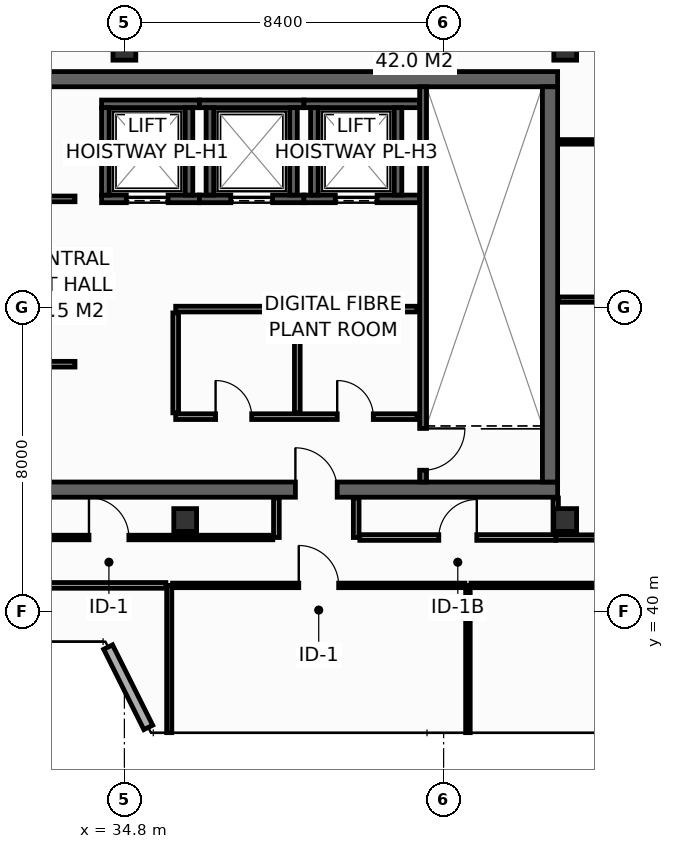
"""IFC4 building model, lengths in metres.
Left out: names, types, materials, properties, quantities, classifications, styles, units other than length and angle.
Written with IfcOpenShell. Run it as: python <this file> out.ifc"""

import sys

from ifc_helpers import new_model, si_unit, direction, frame, frame_2d, origin, origin_2d, place, context, subcontext, project, spatial, rectangle, hollow_rectangle, extrude, element, fill, save


model = new_model("IFC4")
c1 = context("Model", 3, precision=1e-05, world=origin(), true_north=direction((0.0, 1.0)))
c2 = subcontext(c1, "Body", "Model", "MODEL_VIEW")
j1 = project(units=[si_unit("LENGTHUNIT", "METRE"), si_unit("PLANEANGLEUNIT", "RADIAN")], contexts=[c1])
p1 = place(None, origin())
s1 = spatial("IfcSite", under=j1, at=p1, CompositionType="ELEMENT")
p2 = place(p1, origin())
s2 = spatial("IfcBuilding", under=s1, at=p2, CompositionType="ELEMENT")
p3 = place(p2, frame((0.0, 0.0, 323.4)))
s3 = spatial("IfcBuildingStorey", under=s2, at=p3, CompositionType="ELEMENT", Elevation=323.4)
p4 = place(p3, frame((13.7, 43.2, 0.0), z_axis=(0.0, 0.0, 1.0), x_axis=(1.0, 0.0, 0.0)))
e1 = element("IfcWall", 1, at=p4, inside=s3, PredefinedType="SHEAR", context=c2, shape_type="SweptSolid", body=[
    extrude(rectangle(XDim=32.5, YDim=0.4, at=frame_2d((16.25, 0.0))), origin(), (0.0, 0.0, 1.0), 3.9),
])
p5 = place(p4, frame((5.4, 0.0, 0.0)))
e2 = element("IfcOpeningElement", 2, at=p5, cuts=e1, PredefinedType="OPENING", context=c2, shape_type="SweptSolid", body=[
    extrude(rectangle(XDim=1.1, YDim=2.15, at=frame_2d((0.55, 1.075))), frame((0.0, 0.21, 0.0), z_axis=(0.0, -1.0, 0.0), x_axis=(1.0, 0.0, 0.0)), (0.0, 0.0, 1.0), 0.42),
])
p6 = place(p4, frame((25.6, 0.0, 0.0)))
e3 = element("IfcOpeningElement", 3, at=p6, cuts=e1, PredefinedType="OPENING", context=c2, shape_type="SweptSolid", body=[
    extrude(rectangle(XDim=1.1, YDim=2.15, at=frame_2d((0.55, 1.075))), frame((0.0, 0.21, 0.0), z_axis=(0.0, -1.0, 0.0), x_axis=(1.0, 0.0, 0.0)), (0.0, 0.0, 1.0), 0.42),
])
p7 = place(p3, frame((13.7, 54.0, 0.0), z_axis=(0.0, 0.0, 1.0), x_axis=(1.0, 0.0, 0.0)))
e4 = element("IfcWall", 4, at=p7, inside=s3, PredefinedType="SHEAR", context=c2, shape_type="SweptSolid", body=[
    extrude(rectangle(XDim=32.5, YDim=0.4, at=frame_2d((16.25, 0.0))), origin(), (0.0, 0.0, 1.0), 3.9),
])
p8 = place(p3, frame((46.0, 43.4, 0.0), z_axis=(0.0, 0.0, 1.0), x_axis=(0.0, 1.0, 0.0)))
e5 = element("IfcWall", 5, at=p8, inside=s3, PredefinedType="SHEAR", context=c2, shape_type="SweptSolid", body=[
    extrude(rectangle(XDim=10.4, YDim=0.4, at=frame_2d((5.2, 0.0))), origin(), (0.0, 0.0, 1.0), 3.9),
])
for number, where, z_axis, x_axis in (
    (6, (34.8, 54.8, 0.0), (0.0, 0.0, 1.0), (1.0, 0.0, 0.0)),
    (7, (46.4, 54.8, 0.0), (0.0, 0.0, 1.0), (1.0, 0.0, 0.0)),
    (8, (36.4, 42.4, 0.0), (0.0, 0.0, 1.0), (1.0, 0.0, 0.0)),
    (9, (46.4, 42.4, 0.0), (0.0, 0.0, 1.0), (1.0, 0.0, 0.0)),
):
    element("IfcColumn", number, at=place(p3, frame(where, z_axis=z_axis, x_axis=x_axis)), inside=s3, PredefinedType="COLUMN", context=c2, shape_type="SweptSolid", body=[
        extrude(hollow_rectangle(XDim=0.6, YDim=0.6, WallThickness=0.028, at=origin_2d()), origin(), (0.0, 0.0, 1.0), 4.2),
    ])
p9 = place(p3, frame((34.2, 50.85, 0.0), z_axis=(0.0, 0.0, 1.0), x_axis=(1.0, 0.0, 0.0)))
e10 = element("IfcWall", 10, at=p9, inside=s3, PredefinedType="SHEAR", context=c2, shape_type="SweptSolid", body=[
    extrude(rectangle(XDim=2.575, YDim=0.2, at=frame_2d((1.288, 0.0))), origin(), (0.0, 0.0, 1.0), 3.68),
])
p10 = place(p9, frame((0.65, 0.0, 0.0)))
e11 = element("IfcOpeningElement", 11, at=p10, cuts=e10, PredefinedType="OPENING", context=c2, shape_type="SweptSolid", body=[
    extrude(rectangle(XDim=1.1, YDim=2.2, at=frame_2d((0.55, 1.1))), frame((0.0, 0.11, 0.0), z_axis=(0.0, -1.0, 0.0), x_axis=(1.0, 0.0, 0.0)), (0.0, 0.0, 1.0), 0.22),
])
p11 = place(p3, frame((34.2, 53.35, 0.0), z_axis=(0.0, 0.0, 1.0), x_axis=(1.0, 0.0, 0.0)))
e12 = element("IfcWall", 12, at=p11, inside=s3, PredefinedType="SHEAR", context=c2, shape_type="SweptSolid", body=[
    extrude(rectangle(XDim=2.575, YDim=0.2, at=frame_2d((1.288, 0.0))), origin(), (0.0, 0.0, 1.0), 3.68),
])
for number, where, z_axis, x_axis in (
    (13, (34.3, 50.95, 0.0), (0.0, 0.0, 1.0), (0.0, 1.0, 0.0)),
    (14, (36.5, 50.95, 0.0), (0.0, 0.0, 1.0), (0.0, 1.0, 0.0)),
):
    element("IfcWall", number, at=place(p3, frame(where, z_axis=z_axis, x_axis=x_axis)), inside=s3, PredefinedType="SHEAR", context=c2, shape_type="SweptSolid", body=[
        extrude(rectangle(XDim=2.3, YDim=0.2, at=frame_2d((1.15, 0.0))), origin(), (0.0, 0.0, 1.0), 3.68),
    ])
p12 = place(p3, frame((36.775, 50.85, 0.0), z_axis=(0.0, 0.0, 1.0), x_axis=(1.0, 0.0, 0.0)))
e15 = element("IfcWall", 15, at=p12, inside=s3, PredefinedType="SHEAR", context=c2, shape_type="SweptSolid", body=[
    extrude(rectangle(XDim=2.75, YDim=0.2, at=frame_2d((1.375, 0.0))), origin(), (0.0, 0.0, 1.0), 3.68),
])
p13 = place(p12, frame((0.825, 0.0, 0.0)))
e16 = element("IfcOpeningElement", 16, at=p13, cuts=e15, PredefinedType="OPENING", context=c2, shape_type="SweptSolid", body=[
    extrude(rectangle(XDim=1.1, YDim=2.2, at=frame_2d((0.55, 1.1))), frame((0.0, 0.11, 0.0), z_axis=(0.0, -1.0, 0.0), x_axis=(1.0, 0.0, 0.0)), (0.0, 0.0, 1.0), 0.22),
])
p14 = place(p3, frame((36.775, 53.35, 0.0), z_axis=(0.0, 0.0, 1.0), x_axis=(1.0, 0.0, 0.0)))
e17 = element("IfcWall", 17, at=p14, inside=s3, PredefinedType="SHEAR", context=c2, shape_type="SweptSolid", body=[
    extrude(rectangle(XDim=2.75, YDim=0.2, at=frame_2d((1.375, 0.0))), origin(), (0.0, 0.0, 1.0), 3.68),
])
for number, where, z_axis, x_axis in (
    (18, (37.05, 50.95, 0.0), (0.0, 0.0, 1.0), (0.0, 1.0, 0.0)),
    (19, (39.25, 50.95, 0.0), (0.0, 0.0, 1.0), (0.0, 1.0, 0.0)),
):
    element("IfcWall", number, at=place(p3, frame(where, z_axis=z_axis, x_axis=x_axis)), inside=s3, PredefinedType="SHEAR", context=c2, shape_type="SweptSolid", body=[
        extrude(rectangle(XDim=2.3, YDim=0.2, at=frame_2d((1.15, 0.0))), origin(), (0.0, 0.0, 1.0), 3.68),
    ])
p15 = place(p3, frame((39.525, 50.85, 0.0), z_axis=(0.0, 0.0, 1.0), x_axis=(1.0, 0.0, 0.0)))
e20 = element("IfcWall", 20, at=p15, inside=s3, PredefinedType="SHEAR", context=c2, shape_type="SweptSolid", body=[
    extrude(rectangle(XDim=3.045, YDim=0.2, at=frame_2d((1.522, 0.0))), origin(), (0.0, 0.0, 1.0), 3.68),
])
p16 = place(p15, frame((0.825, 0.0, 0.0)))
e21 = element("IfcOpeningElement", 21, at=p16, cuts=e20, PredefinedType="OPENING", context=c2, shape_type="SweptSolid", body=[
    extrude(rectangle(XDim=1.1, YDim=2.2, at=frame_2d((0.55, 1.1))), frame((0.0, 0.11, 0.0), z_axis=(0.0, -1.0, 0.0), x_axis=(1.0, 0.0, 0.0)), (0.0, 0.0, 1.0), 0.22),
])
p17 = place(p3, frame((39.525, 53.35, 0.0), z_axis=(0.0, 0.0, 1.0), x_axis=(1.0, 0.0, 0.0)))
e22 = element("IfcWall", 22, at=p17, inside=s3, PredefinedType="SHEAR", context=c2, shape_type="SweptSolid", body=[
    extrude(rectangle(XDim=3.045, YDim=0.2, at=frame_2d((1.522, 0.0))), origin(), (0.0, 0.0, 1.0), 3.68),
])
for number, where, z_axis, x_axis in (
    (23, (39.8, 50.95, 0.0), (0.0, 0.0, 1.0), (0.0, 1.0, 0.0)),
    (24, (42.0, 50.95, 0.0), (0.0, 0.0, 1.0), (0.0, 1.0, 0.0)),
):
    element("IfcWall", number, at=place(p3, frame(where, z_axis=z_axis, x_axis=x_axis)), inside=s3, PredefinedType="SHEAR", context=c2, shape_type="SweptSolid", body=[
        extrude(rectangle(XDim=2.3, YDim=0.2, at=frame_2d((1.15, 0.0))), origin(), (0.0, 0.0, 1.0), 3.68),
    ])
p18 = place(p3, frame((42.66, 53.8, 0.0), z_axis=(0.0, 0.0, 1.0), x_axis=(0.0, -1.0, 0.0)))
e25 = element("IfcWall", 25, at=p18, inside=s3, PredefinedType="SHEAR", context=c2, shape_type="SweptSolid", body=[
    extrude(rectangle(XDim=10.4, YDim=0.18, at=frame_2d((5.2, 0.0))), origin(), (0.0, 0.0, 1.0), 3.9),
])
p19 = place(p18, frame((8.99, 0.0, 0.0)))
e26 = element("IfcOpeningElement", 26, at=p19, cuts=e25, PredefinedType="OPENING", context=c2, shape_type="SweptSolid", body=[
    extrude(rectangle(XDim=1.1, YDim=2.15, at=frame_2d((0.55, 1.075))), frame((0.0, 0.1, 0.0), z_axis=(0.0, -1.0, 0.0), x_axis=(1.0, 0.0, 0.0)), (0.0, 0.0, 1.0), 0.2),
])
p20 = place(p3, frame((36.15, 45.12, 0.0), z_axis=(0.0, 0.0, 1.0), x_axis=(1.0, 0.0, 0.0)))
e27 = element("IfcWall", 27, at=p20, inside=s3, PredefinedType="PARTITIONING", context=c2, shape_type="SweptSolid", body=[
    extrude(rectangle(XDim=6.35, YDim=0.15, at=frame_2d((3.175, 0.0))), origin(), (0.0, 0.0, 1.0), 3.9),
])
p21 = place(p20, frame((1.05, 0.0, 0.0)))
e28 = element("IfcOpeningElement", 28, at=p21, cuts=e27, PredefinedType="OPENING", context=c2, shape_type="SweptSolid", body=[
    extrude(rectangle(XDim=0.95, YDim=2.15, at=frame_2d((0.475, 1.075))), frame((0.0, 0.085, 0.0), z_axis=(0.0, -1.0, 0.0), x_axis=(1.0, 0.0, 0.0)), (0.0, 0.0, 1.0), 0.17),
])
p22 = place(p20, frame((4.25, 0.0, 0.0)))
e29 = element("IfcOpeningElement", 29, at=p22, cuts=e27, PredefinedType="OPENING", context=c2, shape_type="SweptSolid", body=[
    extrude(rectangle(XDim=0.95, YDim=2.15, at=frame_2d((0.475, 1.075))), frame((0.0, 0.085, 0.0), z_axis=(0.0, -1.0, 0.0), x_axis=(1.0, 0.0, 0.0)), (0.0, 0.0, 1.0), 0.17),
])
p23 = place(p3, frame((36.15, 47.95, 0.0), z_axis=(0.0, 0.0, 1.0), x_axis=(1.0, 0.0, 0.0)))
e30 = element("IfcWall", 30, at=p23, inside=s3, PredefinedType="PARTITIONING", context=c2, shape_type="SweptSolid", body=[
    extrude(rectangle(XDim=6.35, YDim=0.15, at=frame_2d((3.175, 0.0))), origin(), (0.0, 0.0, 1.0), 3.9),
])
for number, where, z_axis, x_axis in (
    (31, (36.15, 45.22, 0.0), (0.0, 0.0, 1.0), (0.0, 1.0, 0.0)),
    (32, (39.35, 45.22, 0.0), (0.0, 0.0, 1.0), (0.0, 1.0, 0.0)),
):
    element("IfcWall", number, at=place(p3, frame(where, z_axis=z_axis, x_axis=x_axis)), inside=s3, PredefinedType="PARTITIONING", context=c2, shape_type="SweptSolid", body=[
        extrude(rectangle(XDim=2.63, YDim=0.15, at=frame_2d((1.315, 0.0))), origin(), (0.0, 0.0, 1.0), 3.9),
    ])
p24 = place(p3, frame((25.85, 50.85, 0.0), z_axis=(0.0, 0.0, 1.0), x_axis=(1.0, 0.0, 0.0)))
e33 = element("IfcWall", 33, at=p24, inside=s3, PredefinedType="PARTITIONING", context=c2, shape_type="SweptSolid", body=[
    extrude(rectangle(XDim=7.65, YDim=0.15, at=frame_2d((3.825, 0.0))), origin(), (0.0, 0.0, 1.0), 3.9),
])
p25 = place(p24, frame((1.25, 0.0, 0.0)))
e34 = element("IfcOpeningElement", 34, at=p25, cuts=e33, PredefinedType="OPENING", context=c2, shape_type="SweptSolid", body=[
    extrude(rectangle(XDim=0.95, YDim=2.15, at=frame_2d((0.475, 1.075))), frame((0.0, 0.085, 0.0), z_axis=(0.0, -1.0, 0.0), x_axis=(1.0, 0.0, 0.0)), (0.0, 0.0, 1.0), 0.17),
])
p26 = place(p24, frame((5.05, 0.0, 0.0)))
e35 = element("IfcOpeningElement", 35, at=p26, cuts=e33, PredefinedType="OPENING", context=c2, shape_type="SweptSolid", body=[
    extrude(rectangle(XDim=0.95, YDim=2.15, at=frame_2d((0.475, 1.075))), frame((0.0, 0.085, 0.0), z_axis=(0.0, -1.0, 0.0), x_axis=(1.0, 0.0, 0.0)), (0.0, 0.0, 1.0), 0.17),
])
p27 = place(p3, frame((25.85, 46.5, 0.0), z_axis=(0.0, 0.0, 1.0), x_axis=(1.0, 0.0, 0.0)))
e36 = element("IfcWall", 36, at=p27, inside=s3, PredefinedType="PARTITIONING", context=c2, shape_type="SweptSolid", body=[
    extrude(rectangle(XDim=7.65, YDim=0.15, at=frame_2d((3.825, 0.0))), origin(), (0.0, 0.0, 1.0), 3.9),
])
p28 = place(p27, frame((2.8, 0.0, 0.0)))
e37 = element("IfcOpeningElement", 37, at=p28, cuts=e36, PredefinedType="OPENING", context=c2, shape_type="SweptSolid", body=[
    extrude(rectangle(XDim=0.95, YDim=2.15, at=frame_2d((0.475, 1.075))), frame((0.0, 0.085, 0.0), z_axis=(0.0, -1.0, 0.0), x_axis=(1.0, 0.0, 0.0)), (0.0, 0.0, 1.0), 0.17),
])
p29 = place(p3, frame((34.372, 39.057, 0.0), z_axis=(0.0, 0.0, 1.0), x_axis=(0.4472135955, -0.894427191, 0.0)))
e38 = element("IfcWall", 38, at=p29, inside=s3, PredefinedType="STANDARD", context=c2, shape_type="SweptSolid", body=[
    extrude(rectangle(XDim=2.363, YDim=0.26, at=frame_2d((1.182, 0.0))), origin(), (0.0, 0.0, 1.0), 3.9),
])
p30 = place(p3, frame((46.15, 41.94, 0.0), z_axis=(0.0, 0.0, 1.0), x_axis=(1.0, 0.0, 0.0)))
e39 = element("IfcWall", 39, at=p30, inside=s3, PredefinedType="PARTITIONING", context=c2, shape_type="SweptSolid", body=[
    extrude(rectangle(XDim=4.05, YDim=0.14, at=frame_2d((2.025, 0.0))), origin(), (0.0, 0.0, 1.0), 3.9),
])
p31 = place(p3, frame((46.15, 42.03, 0.0), z_axis=(0.0, 0.0, 1.0), x_axis=(0.0, 1.0, 0.0)))
e40 = element("IfcWall", 40, at=p31, inside=s3, PredefinedType="PARTITIONING", context=c2, shape_type="SweptSolid", body=[
    extrude(rectangle(XDim=0.95, YDim=0.14, at=frame_2d((0.475, 0.0))), origin(), (0.0, 0.0, 1.0), 3.9),
])
p32 = place(p3, frame((46.22, 48.2, 0.0), z_axis=(0.0, 0.0, 1.0), x_axis=(1.0, 0.0, 0.0)))
e41 = element("IfcWall", 41, at=p32, inside=s3, PredefinedType="PARTITIONING", context=c2, shape_type="SweptSolid", body=[
    extrude(rectangle(XDim=3.98, YDim=0.14, at=frame_2d((1.99, 0.0))), origin(), (0.0, 0.0, 1.0), 3.9),
])
p33 = place(p3, frame((46.22, 52.35, 0.0), z_axis=(0.0, 0.0, 1.0), x_axis=(1.0, 0.0, 0.0)))
e42 = element("IfcWall", 42, at=p33, inside=s3, PredefinedType="PARTITIONING", context=c2, shape_type="SweptSolid", body=[
    extrude(rectangle(XDim=3.98, YDim=0.12, at=frame_2d((1.99, 0.0))), origin(), (0.0, 0.0, 1.0), 3.9),
])
for number, where, z_axis, x_axis in (
    (43, (38.8, 41.94, 0.0), (0.0, 0.0, 1.0), (0.0, 1.0, 0.0)),
    (44, (40.9, 41.94, 0.0), (0.0, 0.0, 1.0), (0.0, 1.0, 0.0)),
):
    element("IfcWall", number, at=place(p3, frame(where, z_axis=z_axis, x_axis=x_axis)), inside=s3, PredefinedType="PARTITIONING", context=c2, shape_type="SweptSolid", body=[
        extrude(rectangle(XDim=1.04, YDim=0.15, at=frame_2d((0.52, 0.0))), origin(), (0.0, 0.0, 1.0), 3.9),
    ])
p34 = place(p3, frame((30.08, 41.94, 0.0), z_axis=(0.0, 0.0, 1.0), x_axis=(1.0, 0.0, 0.0)))
e45 = element("IfcWall", 45, at=p34, inside=s3, PredefinedType="PARTITIONING", context=c2, shape_type="SweptSolid", body=[
    extrude(rectangle(XDim=8.625, YDim=0.12, at=frame_2d((4.312, 0.0))), origin(), (0.0, 0.0, 1.0), 3.9),
])
p35 = place(p34, frame((3.788, 0.0, 0.0)))
e46 = element("IfcOpeningElement", 46, at=p35, cuts=e45, PredefinedType="OPENING", context=c2, shape_type="SweptSolid", body=[
    extrude(rectangle(XDim=1.05, YDim=2.15, at=frame_2d((0.525, 1.075))), frame((0.0, 0.07, 0.0), z_axis=(0.0, -1.0, 0.0), x_axis=(1.0, 0.0, 0.0)), (0.0, 0.0, 1.0), 0.14),
])
p36 = place(p3, frame((40.995, 41.94, 0.0), z_axis=(0.0, 0.0, 1.0), x_axis=(1.0, 0.0, 0.0)))
e47 = element("IfcWall", 47, at=p36, inside=s3, PredefinedType="PARTITIONING", context=c2, shape_type="SweptSolid", body=[
    extrude(rectangle(XDim=5.155, YDim=0.15, at=frame_2d((2.577, 0.0))), origin(), (0.0, 0.0, 1.0), 3.9),
])
p37 = place(p36, frame((2.078, 0.0, 0.0)))
e48 = element("IfcOpeningElement", 48, at=p37, cuts=e47, PredefinedType="OPENING", context=c2, shape_type="SweptSolid", body=[
    extrude(rectangle(XDim=1.0, YDim=2.15, at=frame_2d((0.5, 1.075))), frame((0.0, 0.085, 0.0), z_axis=(0.0, -1.0, 0.0), x_axis=(1.0, 0.0, 0.0)), (0.0, 0.0, 1.0), 0.17),
])
p38 = place(p3, frame((35.98, 36.805, 0.0), z_axis=(0.0, 0.0, 1.0), x_axis=(0.0, 1.0, 0.0)))
e49 = element("IfcWall", 49, at=p38, inside=s3, PredefinedType="PARTITIONING", context=c2, shape_type="SweptSolid", body=[
    extrude(rectangle(XDim=3.875, YDim=0.135, at=frame_2d((1.938, 0.0))), origin(), (0.0, 0.0, 1.0), 3.9),
])
p39 = place(p3, frame((43.84, 36.805, 0.0), z_axis=(0.0, 0.0, 1.0), x_axis=(0.0, 1.0, 0.0)))
e50 = element("IfcWall", 50, at=p39, inside=s3, PredefinedType="PARTITIONING", context=c2, shape_type="SweptSolid", body=[
    extrude(rectangle(XDim=3.875, YDim=0.12, at=frame_2d((1.938, 0.0))), origin(), (0.0, 0.0, 1.0), 3.9),
])
p40 = place(p3, frame((28.19, 40.68, 0.0), z_axis=(0.0, 0.0, 1.0), x_axis=(1.0, 0.0, 0.0)))
e51 = element("IfcWall", 51, at=p40, inside=s3, PredefinedType="PARTITIONING", context=c2, shape_type="SweptSolid", body=[
    extrude(rectangle(XDim=7.703, YDim=0.15, at=frame_2d((3.851, 0.0))), origin(), (0.0, 0.0, 1.0), 3.9),
])
p41 = place(p40, frame((3.326, 0.0, 0.0)))
e52 = element("IfcOpeningElement", 52, at=p41, cuts=e51, PredefinedType="OPENING", context=c2, shape_type="SweptSolid", body=[
    extrude(rectangle(XDim=1.05, YDim=2.15, at=frame_2d((0.525, 1.075))), frame((0.0, 0.085, 0.0), z_axis=(0.0, -1.0, 0.0), x_axis=(1.0, 0.0, 0.0)), (0.0, 0.0, 1.0), 0.17),
])
p42 = place(p3, frame((36.067, 40.68, 0.0), z_axis=(0.0, 0.0, 1.0), x_axis=(1.0, 0.0, 0.0)))
e53 = element("IfcWall", 53, at=p42, inside=s3, PredefinedType="PARTITIONING", context=c2, shape_type="SweptSolid", body=[
    extrude(rectangle(XDim=7.693, YDim=0.12, at=frame_2d((3.846, 0.0))), origin(), (0.0, 0.0, 1.0), 3.9),
])
p43 = place(p42, frame((3.321, 0.0, 0.0)))
e54 = element("IfcOpeningElement", 54, at=p43, cuts=e53, PredefinedType="OPENING", context=c2, shape_type="SweptSolid", body=[
    extrude(rectangle(XDim=1.05, YDim=2.15, at=frame_2d((0.525, 1.075))), frame((0.0, 0.07, 0.0), z_axis=(0.0, -1.0, 0.0), x_axis=(1.0, 0.0, 0.0)), (0.0, 0.0, 1.0), 0.14),
])
p44 = place(p3, frame((43.92, 40.68, 0.0), z_axis=(0.0, 0.0, 1.0), x_axis=(1.0, 0.0, 0.0)))
e55 = element("IfcWall", 55, at=p44, inside=s3, PredefinedType="PARTITIONING", context=c2, shape_type="SweptSolid", body=[
    extrude(rectangle(XDim=9.449, YDim=0.12, at=frame_2d((4.725, 0.0))), origin(), (0.0, 0.0, 1.0), 3.435),
])
p45 = place(p44, frame((4.224, 0.0, 0.0)))
e56 = element("IfcOpeningElement", 56, at=p45, cuts=e55, PredefinedType="OPENING", context=c2, shape_type="SweptSolid", body=[
    extrude(rectangle(XDim=1.0, YDim=2.15, at=frame_2d((0.5, 1.075))), frame((0.0, 0.07, 0.0), z_axis=(0.0, -1.0, 0.0), x_axis=(1.0, 0.0, 0.0)), (0.0, 0.0, 1.0), 0.14),
])
p46 = place(p10, origin())
e57 = element("IfcDoor", 57, at=p46, inside=s3, OperationType="SLIDING_TO_LEFT", PredefinedType="DOOR", context=c2, shape_type="SweptSolid", body=[
    extrude(rectangle(XDim=1.1, YDim=2.2, at=frame_2d((0.55, 1.1))), frame((0.0, 0.025, 0.0), z_axis=(0.0, -1.0, 0.0), x_axis=(1.0, 0.0, 0.0)), (0.0, 0.0, 1.0), 0.05),
])
fill(e11, e57)
p47 = place(p13, origin())
e58 = element("IfcDoor", 58, at=p47, inside=s3, OperationType="SLIDING_TO_LEFT", PredefinedType="DOOR", context=c2, shape_type="SweptSolid", body=[
    extrude(rectangle(XDim=1.1, YDim=2.2, at=frame_2d((0.55, 1.1))), frame((0.0, 0.025, 0.0), z_axis=(0.0, -1.0, 0.0), x_axis=(1.0, 0.0, 0.0)), (0.0, 0.0, 1.0), 0.05),
])
fill(e16, e58)
p48 = place(p16, origin())
e59 = element("IfcDoor", 59, at=p48, inside=s3, OperationType="SLIDING_TO_LEFT", PredefinedType="DOOR", context=c2, shape_type="SweptSolid", body=[
    extrude(rectangle(XDim=1.1, YDim=2.2, at=frame_2d((0.55, 1.1))), frame((0.0, 0.025, 0.0), z_axis=(0.0, -1.0, 0.0), x_axis=(1.0, 0.0, 0.0)), (0.0, 0.0, 1.0), 0.05),
])
fill(e21, e59)
p49 = place(p19, origin())
e60 = element("IfcDoor", 60, at=p49, inside=s3, OperationType="SINGLE_SWING_LEFT", PredefinedType="DOOR", context=c2, shape_type="SweptSolid", body=[
    extrude(rectangle(XDim=1.1, YDim=2.15, at=frame_2d((0.55, 1.075))), frame((0.0, 0.025, 0.0), z_axis=(0.0, -1.0, 0.0), x_axis=(1.0, 0.0, 0.0)), (0.0, 0.0, 1.0), 0.05),
])
fill(e26, e60)
p50 = place(p6, origin())
e61 = element("IfcDoor", 61, at=p50, inside=s3, OperationType="SINGLE_SWING_LEFT", PredefinedType="DOOR", context=c2, shape_type="SweptSolid", body=[
    extrude(rectangle(XDim=1.1, YDim=2.15, at=frame_2d((0.55, 1.075))), frame((0.0, 0.025, 0.0), z_axis=(0.0, -1.0, 0.0), x_axis=(1.0, 0.0, 0.0)), (0.0, 0.0, 1.0), 0.05),
])
fill(e3, e61)
p51 = place(p21, origin())
e62 = element("IfcDoor", 62, at=p51, inside=s3, OperationType="SINGLE_SWING_LEFT", PredefinedType="DOOR", context=c2, shape_type="SweptSolid", body=[
    extrude(rectangle(XDim=0.95, YDim=2.15, at=frame_2d((0.475, 1.075))), frame((0.0, 0.025, 0.0), z_axis=(0.0, -1.0, 0.0), x_axis=(1.0, 0.0, 0.0)), (0.0, 0.0, 1.0), 0.05),
])
fill(e28, e62)
p52 = place(p22, origin())
e63 = element("IfcDoor", 63, at=p52, inside=s3, OperationType="SINGLE_SWING_LEFT", PredefinedType="DOOR", context=c2, shape_type="SweptSolid", body=[
    extrude(rectangle(XDim=0.95, YDim=2.15, at=frame_2d((0.475, 1.075))), frame((0.0, 0.025, 0.0), z_axis=(0.0, -1.0, 0.0), x_axis=(1.0, 0.0, 0.0)), (0.0, 0.0, 1.0), 0.05),
])
fill(e29, e63)
p53 = place(p35, origin())
e64 = element("IfcDoor", 64, at=p53, inside=s3, OperationType="SINGLE_SWING_LEFT", PredefinedType="DOOR", context=c2, shape_type="SweptSolid", body=[
    extrude(rectangle(XDim=1.05, YDim=2.15, at=frame_2d((0.525, 1.075))), frame((0.0, 0.025, 0.0), z_axis=(0.0, -1.0, 0.0), x_axis=(1.0, 0.0, 0.0)), (0.0, 0.0, 1.0), 0.05),
])
fill(e46, e64)
p54 = place(p37, origin())
e65 = element("IfcDoor", 65, at=p54, inside=s3, OperationType="SINGLE_SWING_RIGHT", PredefinedType="DOOR", context=c2, shape_type="SweptSolid", body=[
    extrude(rectangle(XDim=1.0, YDim=2.15, at=frame_2d((0.5, 1.075))), frame((0.0, 0.025, 0.0), z_axis=(0.0, -1.0, 0.0), x_axis=(1.0, 0.0, 0.0)), (0.0, 0.0, 1.0), 0.05),
])
fill(e48, e65)
p55 = place(p43, origin())
e66 = element("IfcDoor", 66, at=p55, inside=s3, OperationType="SINGLE_SWING_LEFT", PredefinedType="DOOR", context=c2, shape_type="SweptSolid", body=[
    extrude(rectangle(XDim=1.05, YDim=2.15, at=frame_2d((0.525, 1.075))), frame((0.0, 0.025, 0.0), z_axis=(0.0, -1.0, 0.0), x_axis=(1.0, 0.0, 0.0)), (0.0, 0.0, 1.0), 0.05),
])
fill(e54, e66)
save(model, sys.argv[1])
